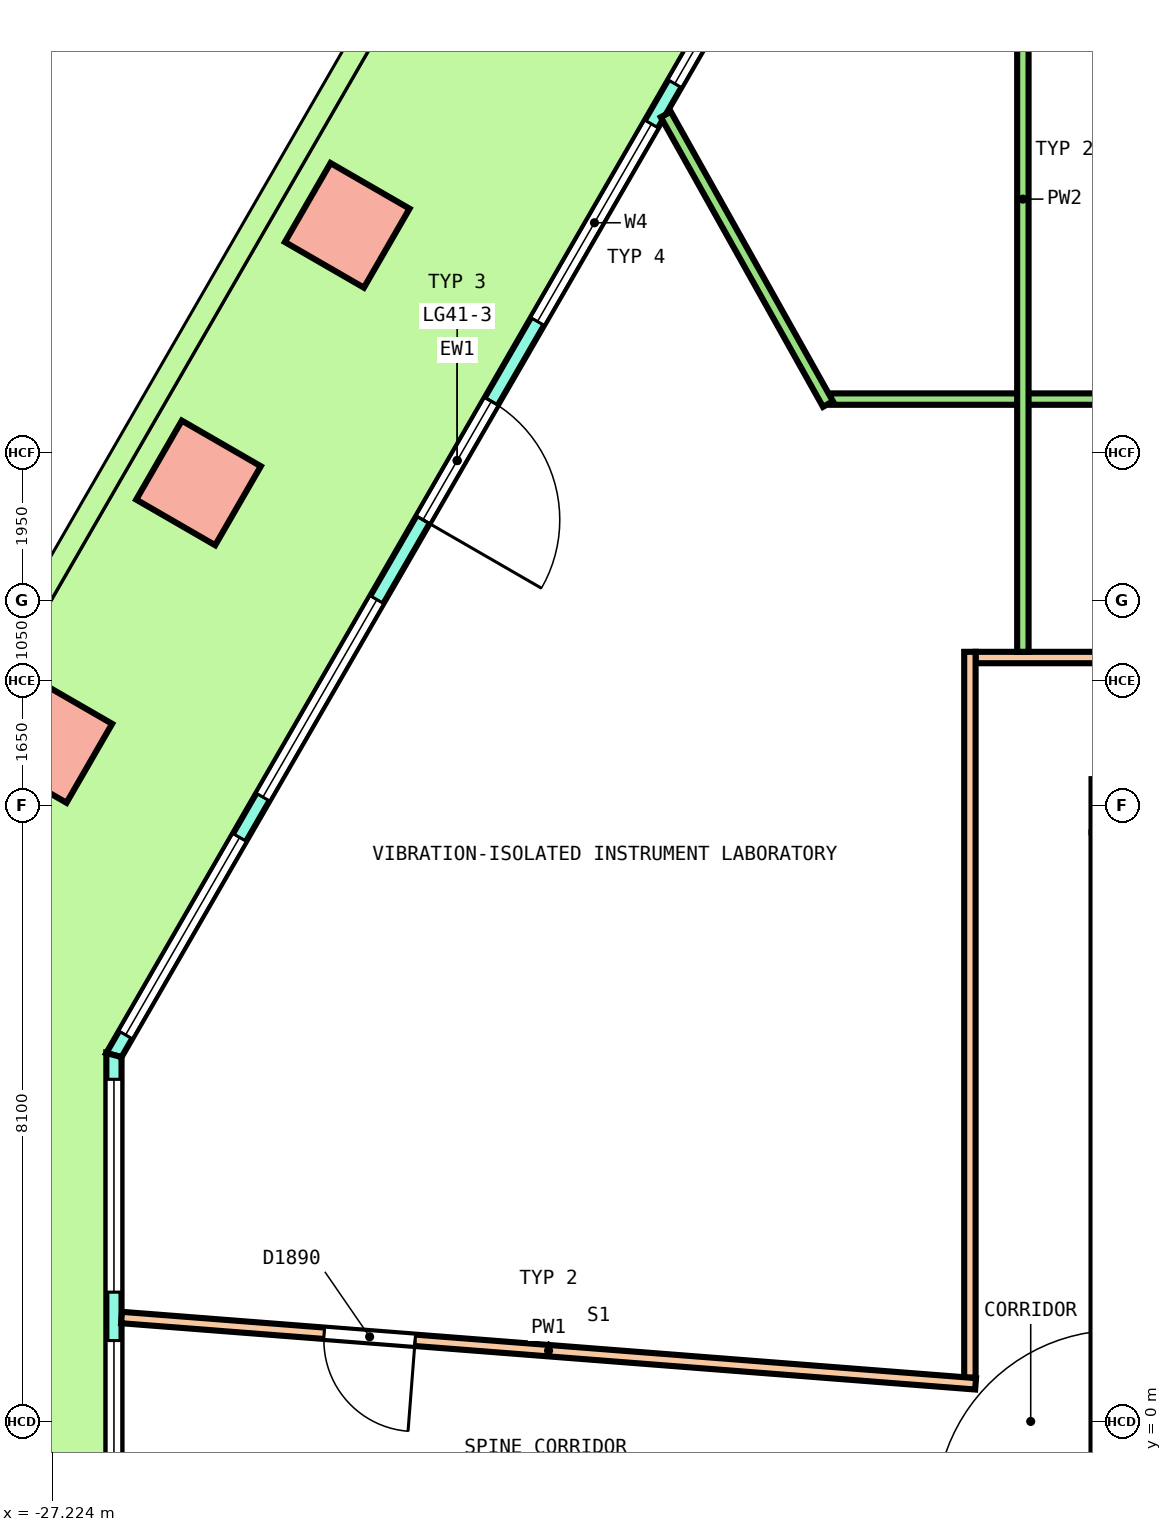
"""IFC4 building model, lengths in metres.
Left out: names, types, materials, properties, quantities, classifications, styles, units other than length and angle.
Written with IfcOpenShell. Run it as: python <this file> out.ifc"""

import sys

from ifc_helpers import new_model, si_unit, direction, frame, frame_2d, origin, origin_2d, place, context, subcontext, project, spatial, polyline, rectangle, outline, extrude, element, fill, save


model = new_model("IFC4")
c1 = context("Model", 3, precision=1e-05, world=origin(), true_north=direction((0.0, 1.0)))
c2 = subcontext(c1, "Body", "Model", "MODEL_VIEW")
j1 = project(units=[si_unit("LENGTHUNIT", "METRE"), si_unit("PLANEANGLEUNIT", "RADIAN")], contexts=[c1])
p1 = place(None, origin())
s1 = spatial("IfcSite", under=j1, at=p1, CompositionType="ELEMENT")
p2 = place(p1, origin())
s2 = spatial("IfcBuilding", under=s1, at=p2, CompositionType="ELEMENT")
p3 = place(p2, frame((0.0, 0.0, 189.2)))
s3 = spatial("IfcBuildingStorey", under=s2, at=p3, CompositionType="ELEMENT", Elevation=189.2)
for number, where, z_axis, x_axis in (
    (1, (-23.342, 15.736, 0.0), (0.0, 0.0, 1.0), (-0.5, -0.866, 0.0)),
    (2, (-25.299, 12.347, 0.0), (0.0, 0.0, 1.0), (-0.5, -0.866, 0.0)),
    (3, (-27.255, 8.959, 0.0), (0.0, 0.0, 1.0), (-0.5, -0.866, 0.0)),
):
    element("IfcColumn", number, at=place(p3, frame(where, z_axis=z_axis, x_axis=x_axis)), inside=s3, PredefinedType="COLUMN", context=c2, shape_type="SweptSolid", body=[
        extrude(rectangle(XDim=1.2, YDim=1.2, at=origin_2d()), origin(), (0.0, 0.0, 1.0), 4.05),
    ])
p4 = place(p3, frame((-17.38, 20.463, 0.0), z_axis=(0.0, 0.0, 1.0), x_axis=(-0.500000137386, -0.866025324465, 0.0)))
e4 = element("IfcWall", 4, at=p4, inside=s3, PredefinedType="SOLIDWALL", context=c2, shape_type="SweptSolid", body=[
    extrude(outline(polyline([(-0.027, -0.1), (0.979, -0.1), (1.986, -0.1), (2.992, -0.1), (3.999, -0.1), (5.005, -0.1), (6.012, -0.1), (7.018, -0.1), (8.025, -0.1), (9.031, -0.1), (10.038, -0.1), (11.044, -0.1), (12.051, -0.1), (13.057, -0.1), (14.063, -0.1), (15.07, -0.1), (16.076, -0.1), (17.083, -0.1), (18.089, -0.1), (18.036, 0.1), (17.035, 0.1), (16.035, 0.1), (15.034, 0.1), (14.034, 0.1), (13.033, 0.1), (12.033, 0.1), (11.032, 0.1), (10.032, 0.1), (9.031, 0.1), (8.031, 0.1), (7.03, 0.1), (6.03, 0.1), (5.029, 0.1), (4.029, 0.1), (3.028, 0.1), (2.028, 0.1), (1.027, 0.1), (0.027, 0.1), (-0.027, -0.1)])), origin(), (0.0, 0.0, 1.0), 4.1),
])
p5 = place(p4, frame((0.306, 0.0, 0.1)))
e5 = element("IfcOpeningElement", 5, at=p5, cuts=e4, PredefinedType="OPENING", context=c2, shape_type="SweptSolid", body=[
    extrude(rectangle(XDim=3.0, YDim=2.9, at=frame_2d((1.5, 1.45))), frame((0.0, 0.11, 0.0), z_axis=(0.0, -1.0, 0.0), x_axis=(1.0, 0.0, 0.0)), (0.0, 0.0, 1.0), 0.22),
])
p6 = place(p4, frame((3.919, 0.0, 0.1)))
e6 = element("IfcOpeningElement", 6, at=p6, cuts=e4, PredefinedType="OPENING", context=c2, shape_type="SweptSolid", body=[
    extrude(rectangle(XDim=3.0, YDim=2.9, at=frame_2d((1.5, 1.45))), frame((0.0, 0.11, 0.0), z_axis=(0.0, -1.0, 0.0), x_axis=(1.0, 0.0, 0.0)), (0.0, 0.0, 1.0), 0.22),
])
p7 = place(p4, frame((8.131, 0.0, 0.0)))
e7 = element("IfcOpeningElement", 7, at=p7, cuts=e4, PredefinedType="OPENING", context=c2, shape_type="SweptSolid", body=[
    extrude(rectangle(XDim=1.8, YDim=2.4, at=frame_2d((0.9, 1.2))), frame((0.0, 0.11, 0.0), z_axis=(0.0, -1.0, 0.0), x_axis=(1.0, 0.0, 0.0)), (0.0, 0.0, 1.0), 0.22),
])
p8 = place(p4, frame((8.131, 0.0, 2.55)))
e8 = element("IfcOpeningElement", 8, at=p8, cuts=e4, PredefinedType="OPENING", context=c2, shape_type="SweptSolid", body=[
    extrude(rectangle(XDim=1.8, YDim=0.45, at=frame_2d((0.9, 0.225))), frame((0.0, 0.11, 0.0), z_axis=(0.0, -1.0, 0.0), x_axis=(1.0, 0.0, 0.0)), (0.0, 0.0, 1.0), 0.22),
])
p9 = place(p4, frame((11.144, 0.0, 0.1)))
e9 = element("IfcOpeningElement", 9, at=p9, cuts=e4, PredefinedType="OPENING", context=c2, shape_type="SweptSolid", body=[
    extrude(rectangle(XDim=3.0, YDim=2.9, at=frame_2d((1.5, 1.45))), frame((0.0, 0.11, 0.0), z_axis=(0.0, -1.0, 0.0), x_axis=(1.0, 0.0, 0.0)), (0.0, 0.0, 1.0), 0.22),
])
p10 = place(p4, frame((14.756, 0.0, 0.1)))
e10 = element("IfcOpeningElement", 10, at=p10, cuts=e4, PredefinedType="OPENING", context=c2, shape_type="SweptSolid", body=[
    extrude(rectangle(XDim=3.0, YDim=2.9, at=frame_2d((1.5, 1.45))), frame((0.0, 0.11, 0.0), z_axis=(0.0, -1.0, 0.0), x_axis=(1.0, 0.0, 0.0)), (0.0, 0.0, 1.0), 0.22),
])
p11 = place(p3, frame((-26.411, 4.82, 0.0), z_axis=(0.0, 0.0, 1.0), x_axis=(0.0, -1.0, 0.0)))
e11 = element("IfcWall", 11, at=p11, inside=s3, PredefinedType="SOLIDWALL", context=c2, shape_type="SweptSolid", body=[
    extrude(outline(polyline([(-0.027, -0.1), (1.128, -0.1), (2.283, -0.1), (3.438, -0.1), (4.592, -0.1), (5.747, -0.1), (6.902, -0.1), (6.848, 0.1), (5.711, 0.1), (4.574, 0.1), (3.438, 0.1), (2.301, 0.1), (1.164, 0.1), (0.027, 0.1), (-0.027, -0.1)])), origin(), (0.0, 0.0, 1.0), 4.1),
])
p12 = place(p11, frame((0.319, 0.0, 0.1)))
e12 = element("IfcOpeningElement", 12, at=p12, cuts=e11, PredefinedType="OPENING", context=c2, shape_type="SweptSolid", body=[
    extrude(rectangle(XDim=2.8, YDim=2.9, at=frame_2d((1.4, 1.45))), frame((0.0, 0.11, 0.0), z_axis=(0.0, -1.0, 0.0), x_axis=(1.0, 0.0, 0.0)), (0.0, 0.0, 1.0), 0.22),
])
p13 = place(p11, frame((3.756, 0.0, 0.1)))
e13 = element("IfcOpeningElement", 13, at=p13, cuts=e11, PredefinedType="OPENING", context=c2, shape_type="SweptSolid", body=[
    extrude(rectangle(XDim=2.8, YDim=2.9, at=frame_2d((1.4, 1.45))), frame((0.0, 0.11, 0.0), z_axis=(0.0, -1.0, 0.0), x_axis=(1.0, 0.0, 0.0)), (0.0, 0.0, 1.0), 0.22),
])
p14 = place(p3, frame((-13.55, 8.1, 0.0), z_axis=(0.0, 0.0, 1.0), x_axis=(1.0, 0.0, 0.0)))
e14 = element("IfcWall", 14, at=p14, inside=s3, PredefinedType="SHEAR", context=c2, shape_type="SweptSolid", body=[
    extrude(rectangle(XDim=27.1, YDim=0.7, at=frame_2d((13.55, 0.0))), origin(), (0.0, 0.0, 1.0), 4.1),
])
p15 = place(p14, frame((14.475, 0.0, 0.0)))
e15 = element("IfcOpeningElement", 15, at=p15, cuts=e14, PredefinedType="OPENING", context=c2, shape_type="SweptSolid", body=[
    extrude(rectangle(XDim=1.4, YDim=2.1, at=frame_2d((0.7, 1.05))), frame((0.0, 0.36, 0.0), z_axis=(0.0, -1.0, 0.0), x_axis=(1.0, 0.0, 0.0)), (0.0, 0.0, 1.0), 0.72),
])
p16 = place(p3, frame((-13.2, -7.75, 0.0), z_axis=(0.0, 0.0, 1.0), x_axis=(0.0, 1.0, 0.0)))
e16 = element("IfcWall", 16, at=p16, inside=s3, PredefinedType="SHEAR", context=c2, shape_type="SweptSolid", body=[
    extrude(rectangle(XDim=15.5, YDim=0.7, at=frame_2d((7.75, 0.0))), origin(), (0.0, 0.0, 1.0), 4.1),
])
p17 = place(p16, frame((6.55, 0.0, 0.0)))
e17 = element("IfcOpeningElement", 17, at=p17, cuts=e16, PredefinedType="OPENING", context=c2, shape_type="SweptSolid", body=[
    extrude(rectangle(XDim=2.4, YDim=2.1, at=frame_2d((1.2, 1.05))), frame((0.0, 0.36, 0.0), z_axis=(0.0, -1.0, 0.0), x_axis=(1.0, 0.0, 0.0)), (0.0, 0.0, 1.0), 0.72),
])
p18 = place(p16, frame((13.45, 0.0, 0.0)))
e18 = element("IfcOpeningElement", 18, at=p18, cuts=e16, PredefinedType="OPENING", context=c2, shape_type="SweptSolid", body=[
    extrude(rectangle(XDim=1.2, YDim=2.1, at=frame_2d((0.6, 1.05))), frame((0.0, 0.36, 0.0), z_axis=(0.0, -1.0, 0.0), x_axis=(1.0, 0.0, 0.0)), (0.0, 0.0, 1.0), 0.72),
])
p19 = place(p16, frame((0.85, 0.0, 0.0)))
e19 = element("IfcOpeningElement", 19, at=p19, cuts=e16, PredefinedType="OPENING", context=c2, shape_type="SweptSolid", body=[
    extrude(rectangle(XDim=1.2, YDim=2.1, at=frame_2d((0.6, 1.05))), frame((0.0, 0.36, 0.0), z_axis=(0.0, -1.0, 0.0), x_axis=(1.0, 0.0, 0.0)), (0.0, 0.0, 1.0), 0.72),
])
p20 = place(p3, frame((-15.075, 10.05, 0.0), z_axis=(0.0, 0.0, 1.0), x_axis=(1.0, 0.0, 0.0)))
e20 = element("IfcWall", 20, at=p20, inside=s3, PredefinedType="PARTITIONING", context=c2, shape_type="SweptSolid", body=[
    extrude(rectangle(XDim=30.15, YDim=0.15, at=frame_2d((15.075, 0.0))), origin(), (0.0, 0.0, 1.0), 3.05),
])
p21 = place(p20, frame((26.573, 0.0, 0.0)))
e21 = element("IfcOpeningElement", 21, at=p21, cuts=e20, PredefinedType="OPENING", context=c2, shape_type="SweptSolid", body=[
    extrude(rectangle(XDim=1.0, YDim=2.1, at=frame_2d((0.5, 1.05))), frame((0.0, 0.085, 0.0), z_axis=(0.0, -1.0, 0.0), x_axis=(1.0, 0.0, 0.0)), (0.0, 0.0, 1.0), 0.17),
])
p22 = place(p20, frame((10.684, 0.0, 0.0)))
e22 = element("IfcOpeningElement", 22, at=p22, cuts=e20, PredefinedType="OPENING", context=c2, shape_type="SweptSolid", body=[
    extrude(rectangle(XDim=1.2, YDim=2.1, at=frame_2d((0.6, 1.05))), frame((0.0, 0.085, 0.0), z_axis=(0.0, -1.0, 0.0), x_axis=(1.0, 0.0, 0.0)), (0.0, 0.0, 1.0), 0.17),
])
p23 = place(p3, frame((-15.15, 0.576, 0.0), z_axis=(0.0, 0.0, 1.0), x_axis=(0.0, 1.0, 0.0)))
e23 = element("IfcWall", 23, at=p23, inside=s3, PredefinedType="PARTITIONING", context=c2, shape_type="SweptSolid", body=[
    extrude(rectangle(XDim=9.549, YDim=0.15, at=frame_2d((4.775, 0.0))), origin(), (0.0, 0.0, 1.0), 3.05),
])
p24 = place(p3, frame((-26.311, 1.367, 0.0), z_axis=(0.0, 0.0, 1.0), x_axis=(0.996999820834, -0.077403858151, 0.0)))
e24 = element("IfcWall", 24, at=p24, inside=s3, PredefinedType="PARTITIONING", context=c2, shape_type="SweptSolid", body=[
    extrude(rectangle(XDim=11.27, YDim=0.15, at=frame_2d((5.635, 0.0))), origin(), (0.0, 0.0, 1.0), 3.05),
])
p25 = place(p24, frame((2.674, 0.0, 0.0)))
e25 = element("IfcOpeningElement", 25, at=p25, cuts=e24, PredefinedType="OPENING", context=c2, shape_type="SweptSolid", body=[
    extrude(rectangle(XDim=1.2, YDim=2.1, at=frame_2d((0.6, 1.05))), frame((0.0, 0.085, 0.0), z_axis=(0.0, -1.0, 0.0), x_axis=(1.0, 0.0, 0.0)), (0.0, 0.0, 1.0), 0.17),
])
p26 = place(p3, frame((-16.979, 13.45, 0.0), z_axis=(0.0, 0.0, 1.0), x_axis=(1.0, 0.0, 0.0)))
e26 = element("IfcWall", 26, at=p26, inside=s3, PredefinedType="PARTITIONING", context=c2, shape_type="SweptSolid", body=[
    extrude(rectangle(XDim=35.454, YDim=0.15, at=frame_2d((17.727, 0.0))), origin(), (0.0, 0.0, 1.0), 3.05),
])
p27 = place(p26, frame((27.623, 0.0, 0.0)))
e27 = element("IfcOpeningElement", 27, at=p27, cuts=e26, PredefinedType="OPENING", context=c2, shape_type="SweptSolid", body=[
    extrude(rectangle(XDim=1.2, YDim=2.1, at=frame_2d((0.6, 1.05))), frame((0.0, 0.085, 0.0), z_axis=(0.0, -1.0, 0.0), x_axis=(1.0, 0.0, 0.0)), (0.0, 0.0, 1.0), 0.17),
])
p28 = place(p3, frame((-14.453, 10.125, 0.0), z_axis=(0.0, 0.0, 1.0), x_axis=(0.0, 1.0, 0.0)))
e28 = element("IfcWall", 28, at=p28, inside=s3, PredefinedType="PARTITIONING", context=c2, shape_type="SweptSolid", body=[
    extrude(rectangle(XDim=11.912, YDim=0.15, at=frame_2d((5.956, 0.0))), origin(), (0.0, 0.0, 1.0), 3.05),
])
p29 = place(p28, frame((8.152, 0.0, 0.0)))
e29 = element("IfcOpeningElement", 29, at=p29, cuts=e28, PredefinedType="OPENING", context=c2, shape_type="SweptSolid", body=[
    extrude(rectangle(XDim=1.0, YDim=2.1, at=frame_2d((0.5, 1.05))), frame((0.0, 0.085, 0.0), z_axis=(0.0, -1.0, 0.0), x_axis=(1.0, 0.0, 0.0)), (0.0, 0.0, 1.0), 0.17),
])
p30 = place(p3, frame((-19.151, 17.195, 0.0), z_axis=(0.0, 0.0, 1.0), x_axis=(0.48858294178, -0.872517454841, 0.0)))
e30 = element("IfcWall", 30, at=p30, inside=s3, PredefinedType="PARTITIONING", context=c2, shape_type="SweptSolid", body=[
    extrude(rectangle(XDim=4.367, YDim=0.15, at=frame_2d((2.184, 0.0))), origin(), (0.0, 0.0, 1.0), 3.05),
])
p31 = place(p5, origin())
e31 = element("IfcWindow", 31, at=p31, inside=s3, PartitioningType="SINGLE_PANEL", PredefinedType="WINDOW", context=c2, shape_type="SweptSolid", body=[
    extrude(rectangle(XDim=3.0, YDim=2.9, at=frame_2d((1.5, 1.45))), frame((0.0, 0.03, 0.0), z_axis=(0.0, -1.0, 0.0), x_axis=(1.0, 0.0, 0.0)), (0.0, 0.0, 1.0), 0.06),
])
fill(e5, e31)
p32 = place(p6, origin())
e32 = element("IfcWindow", 32, at=p32, inside=s3, PartitioningType="SINGLE_PANEL", PredefinedType="WINDOW", context=c2, shape_type="SweptSolid", body=[
    extrude(rectangle(XDim=3.0, YDim=2.9, at=frame_2d((1.5, 1.45))), frame((0.0, 0.03, 0.0), z_axis=(0.0, -1.0, 0.0), x_axis=(1.0, 0.0, 0.0)), (0.0, 0.0, 1.0), 0.06),
])
fill(e6, e32)
p33 = place(p7, origin())
e33 = element("IfcDoor", 33, at=p33, inside=s3, OperationType="DOUBLE_DOOR_SINGLE_SWING", PredefinedType="DOOR", context=c2, shape_type="SweptSolid", body=[
    extrude(rectangle(XDim=1.8, YDim=2.4, at=frame_2d((0.9, 1.2))), frame((0.0, 0.025, 0.0), z_axis=(0.0, -1.0, 0.0), x_axis=(1.0, 0.0, 0.0)), (0.0, 0.0, 1.0), 0.05),
])
fill(e7, e33)
p34 = place(p8, origin())
e34 = element("IfcWindow", 34, at=p34, inside=s3, PartitioningType="SINGLE_PANEL", PredefinedType="WINDOW", context=c2, shape_type="SweptSolid", body=[
    extrude(rectangle(XDim=1.8, YDim=0.45, at=frame_2d((0.9, 0.225))), frame((0.0, 0.03, 0.0), z_axis=(0.0, -1.0, 0.0), x_axis=(1.0, 0.0, 0.0)), (0.0, 0.0, 1.0), 0.06),
])
fill(e8, e34)
p35 = place(p9, origin())
e35 = element("IfcWindow", 35, at=p35, inside=s3, PartitioningType="SINGLE_PANEL", PredefinedType="WINDOW", context=c2, shape_type="SweptSolid", body=[
    extrude(rectangle(XDim=3.0, YDim=2.9, at=frame_2d((1.5, 1.45))), frame((0.0, 0.03, 0.0), z_axis=(0.0, -1.0, 0.0), x_axis=(1.0, 0.0, 0.0)), (0.0, 0.0, 1.0), 0.06),
])
fill(e9, e35)
p36 = place(p10, origin())
e36 = element("IfcWindow", 36, at=p36, inside=s3, PartitioningType="SINGLE_PANEL", PredefinedType="WINDOW", context=c2, shape_type="SweptSolid", body=[
    extrude(rectangle(XDim=3.0, YDim=2.9, at=frame_2d((1.5, 1.45))), frame((0.0, 0.03, 0.0), z_axis=(0.0, -1.0, 0.0), x_axis=(1.0, 0.0, 0.0)), (0.0, 0.0, 1.0), 0.06),
])
fill(e10, e36)
p37 = place(p12, origin())
e37 = element("IfcWindow", 37, at=p37, inside=s3, PartitioningType="SINGLE_PANEL", PredefinedType="WINDOW", context=c2, shape_type="SweptSolid", body=[
    extrude(rectangle(XDim=2.8, YDim=2.9, at=frame_2d((1.4, 1.45))), frame((0.0, 0.03, 0.0), z_axis=(0.0, -1.0, 0.0), x_axis=(1.0, 0.0, 0.0)), (0.0, 0.0, 1.0), 0.06),
])
fill(e12, e37)
p38 = place(p13, origin())
e38 = element("IfcWindow", 38, at=p38, inside=s3, PartitioningType="SINGLE_PANEL", PredefinedType="WINDOW", context=c2, shape_type="SweptSolid", body=[
    extrude(rectangle(XDim=2.8, YDim=2.9, at=frame_2d((1.4, 1.45))), frame((0.0, 0.03, 0.0), z_axis=(0.0, -1.0, 0.0), x_axis=(1.0, 0.0, 0.0)), (0.0, 0.0, 1.0), 0.06),
])
fill(e13, e38)
p39 = place(p25, origin())
e39 = element("IfcDoor", 39, at=p39, inside=s3, OperationType="DOUBLE_DOOR_SINGLE_SWING", PredefinedType="DOOR", context=c2, shape_type="SweptSolid", body=[
    extrude(rectangle(XDim=1.2, YDim=2.1, at=frame_2d((0.6, 1.05))), frame((0.0, 0.025, 0.0), z_axis=(0.0, -1.0, 0.0), x_axis=(1.0, 0.0, 0.0)), (0.0, 0.0, 1.0), 0.05),
])
fill(e25, e39)
save(model, sys.argv[1])
